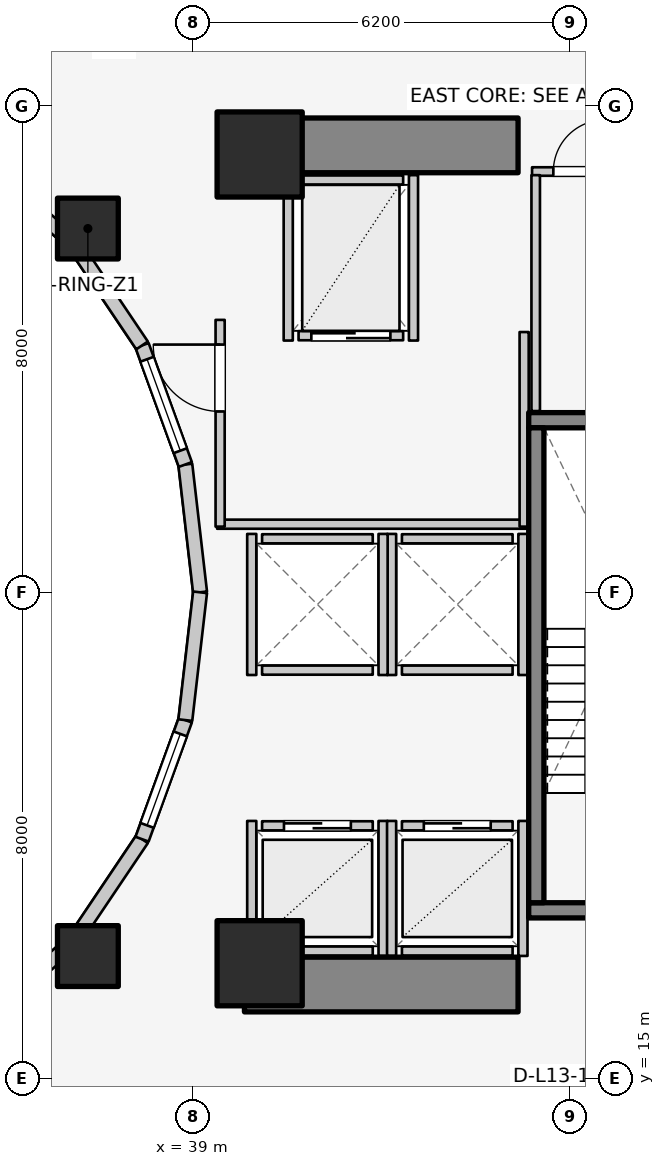
"""IFC4 building model, lengths in metres.
Left out: names, types, materials, properties, quantities, classifications, styles, units other than length and angle.
Written with IfcOpenShell. Run it as: python <this file> out.ifc"""

import sys

from ifc_helpers import new_model, si_unit, direction, frame, frame_2d, origin, origin_2d, place, context, subcontext, project, spatial, rectangle, extrude, element, fill, save


model = new_model("IFC4")
c1 = context("Model", 3, precision=1e-05, world=origin(), true_north=direction((0.0, 1.0)))
c2 = subcontext(c1, "Body", "Model", "MODEL_VIEW")
j1 = project(units=[si_unit("LENGTHUNIT", "METRE"), si_unit("PLANEANGLEUNIT", "RADIAN")], contexts=[c1])
p1 = place(None, origin())
s1 = spatial("IfcSite", under=j1, at=p1, CompositionType="ELEMENT")
p2 = place(p1, origin())
s2 = spatial("IfcBuilding", under=s1, at=p2, CompositionType="ELEMENT")
p3 = place(p2, frame((0.0, 0.0, 46.2)))
s3 = spatial("IfcBuildingStorey", under=s2, at=p3, CompositionType="ELEMENT", Elevation=46.2)
for number, where, z_axis, x_axis in (
    (1, (39.85, 16.55, 0.0), (0.0, 0.0, 1.0), (1.0, 0.0, 0.0)),
    (2, (39.85, 30.35, 0.0), (0.0, 0.0, 1.0), (1.0, 0.0, 0.0)),
):
    element("IfcWall", number, at=place(p3, frame(where, z_axis=z_axis, x_axis=x_axis)), inside=s3, PredefinedType="SHEAR", context=c2, shape_type="SweptSolid", body=[
        extrude(rectangle(XDim=4.5, YDim=0.9, at=frame_2d((2.25, 0.0))), origin(), (0.0, 0.0, 1.0), 3.1),
    ])
p4 = place(p3, frame((44.525, 17.77, 0.0), z_axis=(0.0, 0.0, 1.0), x_axis=(1.0, 0.0, 0.0)))
e3 = element("IfcWall", 3, at=p4, inside=s3, PredefinedType="SOLIDWALL", context=c2, shape_type="SweptSolid", body=[
    extrude(rectangle(XDim=3.37, YDim=0.25, at=frame_2d((1.685, 0.0))), origin(), (0.0, 0.0, 1.0), 3.1),
])
p5 = place(p4, frame((1.135, 0.0, 0.0)))
e4 = element("IfcOpeningElement", 4, at=p5, cuts=e3, PredefinedType="OPENING", context=c2, shape_type="SweptSolid", body=[
    extrude(rectangle(XDim=1.1, YDim=2.1, at=frame_2d((0.55, 1.05))), frame((0.0, 0.135, 0.0), z_axis=(0.0, -1.0, 0.0), x_axis=(1.0, 0.0, 0.0)), (0.0, 0.0, 1.0), 0.27),
])
p6 = place(p3, frame((44.525, 25.83, 0.0), z_axis=(0.0, 0.0, 1.0), x_axis=(1.0, 0.0, 0.0)))
e5 = element("IfcWall", 5, at=p6, inside=s3, PredefinedType="SOLIDWALL", context=c2, shape_type="SweptSolid", body=[
    extrude(rectangle(XDim=3.37, YDim=0.25, at=frame_2d((1.685, 0.0))), origin(), (0.0, 0.0, 1.0), 3.1),
])
p7 = place(p3, frame((44.65, 17.895, 0.0), z_axis=(0.0, 0.0, 1.0), x_axis=(0.0, 1.0, 0.0)))
e6 = element("IfcWall", 6, at=p7, inside=s3, PredefinedType="SOLIDWALL", context=c2, shape_type="SweptSolid", body=[
    extrude(rectangle(XDim=7.81, YDim=0.25, at=frame_2d((3.905, 0.0))), origin(), (0.0, 0.0, 1.0), 3.1),
])
for number, where, z_axis, x_axis in (
    (7, (40.1, 16.9, 0.0), (0.0, 0.0, 1.0), (1.0, 0.0, 0.0)),
    (8, (40.1, 30.2, 0.0), (0.0, 0.0, 1.0), (1.0, 0.0, 0.0)),
):
    element("IfcColumn", number, at=place(p3, frame(where, z_axis=z_axis, x_axis=x_axis)), inside=s3, PredefinedType="COLUMN", context=c2, shape_type="SweptSolid", body=[
        extrude(rectangle(XDim=1.4, YDim=1.4, at=origin_2d()), origin(), (0.0, 0.0, 1.0), 3.1),
    ])
for number, where, z_axis, x_axis in (
    (9, (37.275, 28.982, 0.0), (0.0, 0.0, 1.0), (1.0, 0.0, 0.0)),
    (10, (37.275, 17.018, 0.0), (0.0, 0.0, 1.0), (1.0, 0.0, 0.0)),
):
    element("IfcColumn", number, at=place(p3, frame(where, z_axis=z_axis, x_axis=x_axis)), inside=s3, PredefinedType="COLUMN", context=c2, shape_type="SweptSolid", body=[
        extrude(rectangle(XDim=1.0, YDim=1.0, at=origin_2d()), origin(), (0.0, 0.0, 1.0), 3.1),
    ])
p8 = place(p3, frame((39.12, 23.0, 0.0), z_axis=(0.0, 0.0, 1.0), x_axis=(-0.114711713601, 0.993398823617, 0.0)))
e11 = element("IfcWall", 11, at=p8, inside=s3, PredefinedType="STANDARD", context=c2, shape_type="SweptSolid", body=[
    extrude(rectangle(XDim=2.115, YDim=0.23, at=frame_2d((1.058, 0.0))), origin(), (0.0, 0.0, 1.0), 2.84),
])
p9 = place(p3, frame((38.877, 25.102, 0.0), z_axis=(0.0, 0.0, 1.0), x_axis=(-0.341423187295, 0.93990968033, 0.0)))
e12 = element("IfcWall", 12, at=p9, inside=s3, PredefinedType="STANDARD", context=c2, shape_type="SweptSolid", body=[
    extrude(rectangle(XDim=2.084, YDim=0.23, at=frame_2d((1.042, 0.0))), origin(), (0.0, 0.0, 1.0), 2.84),
])
p10 = place(p9, frame((0.242, 0.0, 0.85)))
e13 = element("IfcOpeningElement", 13, at=p10, cuts=e12, PredefinedType="OPENING", context=c2, shape_type="SweptSolid", body=[
    extrude(rectangle(XDim=1.6, YDim=1.65, at=frame_2d((0.8, 0.825))), frame((0.0, 0.125, 0.0), z_axis=(0.0, -1.0, 0.0), x_axis=(1.0, 0.0, 0.0)), (0.0, 0.0, 1.0), 0.25),
])
p11 = place(p3, frame((38.166, 27.06, 0.0), z_axis=(0.0, 0.0, 1.0), x_axis=(-0.558197800898, 0.829707909492, 0.0)))
e14 = element("IfcWall", 14, at=p11, inside=s3, PredefinedType="STANDARD", context=c2, shape_type="SweptSolid", body=[
    extrude(rectangle(XDim=2.027, YDim=0.23, at=frame_2d((1.013, 0.0))), origin(), (0.0, 0.0, 1.0), 2.16),
])
for number, where, z_axis, x_axis in (
    (15, (37.035, 28.742, 0.0), (0.0, 0.0, 1.0), (-0.753, 0.659, 0.0)),
    (16, (35.56, 15.968, 0.0), (0.0, 0.0, 1.0), (0.753, 0.659, 0.0)),
):
    element("IfcWall", number, at=place(p3, frame(where, z_axis=z_axis, x_axis=x_axis)), inside=s3, PredefinedType="STANDARD", context=c2, shape_type="SweptSolid", body=[
        extrude(rectangle(XDim=1.959, YDim=0.23, at=frame_2d((0.98, 0.0))), origin(), (0.0, 0.0, 1.0), 2.16),
    ])
p12 = place(p3, frame((37.035, 17.258, 0.0), z_axis=(0.0, 0.0, 1.0), x_axis=(0.558197800898, 0.829707909492, 0.0)))
e17 = element("IfcWall", 17, at=p12, inside=s3, PredefinedType="STANDARD", context=c2, shape_type="SweptSolid", body=[
    extrude(rectangle(XDim=2.027, YDim=0.23, at=frame_2d((1.013, 0.0))), origin(), (0.0, 0.0, 1.0), 2.16),
])
p13 = place(p3, frame((38.166, 18.94, 0.0), z_axis=(0.0, 0.0, 1.0), x_axis=(0.341423187295, 0.93990968033, 0.0)))
e18 = element("IfcWall", 18, at=p13, inside=s3, PredefinedType="STANDARD", context=c2, shape_type="SweptSolid", body=[
    extrude(rectangle(XDim=2.084, YDim=0.23, at=frame_2d((1.042, 0.0))), origin(), (0.0, 0.0, 1.0), 2.84),
])
p14 = place(p13, frame((0.242, 0.0, 0.85)))
e19 = element("IfcOpeningElement", 19, at=p14, cuts=e18, PredefinedType="OPENING", context=c2, shape_type="SweptSolid", body=[
    extrude(rectangle(XDim=1.6, YDim=1.65, at=frame_2d((0.8, 0.825))), frame((0.0, 0.125, 0.0), z_axis=(0.0, -1.0, 0.0), x_axis=(1.0, 0.0, 0.0)), (0.0, 0.0, 1.0), 0.25),
])
p15 = place(p3, frame((38.877, 20.898, 0.0), z_axis=(0.0, 0.0, 1.0), x_axis=(0.114711713601, 0.993398823617, 0.0)))
e20 = element("IfcWall", 20, at=p15, inside=s3, PredefinedType="STANDARD", context=c2, shape_type="SweptSolid", body=[
    extrude(rectangle(XDim=2.115, YDim=0.23, at=frame_2d((1.058, 0.0))), origin(), (0.0, 0.0, 1.0), 2.84),
])
p16 = place(p3, frame((40.14, 19.16, 0.0), z_axis=(0.0, 0.0, 1.0), x_axis=(1.0, 0.0, 0.0)))
e21 = element("IfcWall", 21, at=p16, inside=s3, PredefinedType="SOLIDWALL", context=c2, shape_type="SweptSolid", body=[
    extrude(rectangle(XDim=1.82, YDim=0.15, at=frame_2d((0.91, 0.0))), origin(), (0.0, 0.0, 1.0), 2.12),
])
p17 = place(p16, frame((0.36, 0.0, 0.0)))
e22 = element("IfcOpeningElement", 22, at=p17, cuts=e21, PredefinedType="OPENING", context=c2, shape_type="SweptSolid", body=[
    extrude(rectangle(XDim=1.1, YDim=2.1, at=frame_2d((0.55, 1.05))), frame((0.0, 0.085, 0.0), z_axis=(0.0, -1.0, 0.0), x_axis=(1.0, 0.0, 0.0)), (0.0, 0.0, 1.0), 0.17),
])
p18 = place(p3, frame((40.14, 17.1, 0.0), z_axis=(0.0, 0.0, 1.0), x_axis=(1.0, 0.0, 0.0)))
e23 = element("IfcWall", 23, at=p18, inside=s3, PredefinedType="SOLIDWALL", context=c2, shape_type="SweptSolid", body=[
    extrude(rectangle(XDim=1.82, YDim=0.15, at=frame_2d((0.91, 0.0))), origin(), (0.0, 0.0, 1.0), 2.12),
])
p19 = place(p3, frame((39.97, 17.02, 0.0), z_axis=(0.0, 0.0, 1.0), x_axis=(0.0, 1.0, 0.0)))
e24 = element("IfcWall", 24, at=p19, inside=s3, PredefinedType="SOLIDWALL", context=c2, shape_type="SweptSolid", body=[
    extrude(rectangle(XDim=2.22, YDim=0.15, at=frame_2d((1.11, 0.0))), origin(), (0.0, 0.0, 1.0), 2.12),
])
p20 = place(p3, frame((42.13, 17.02, 0.0), z_axis=(0.0, 0.0, 1.0), x_axis=(0.0, 1.0, 0.0)))
e25 = element("IfcWall", 25, at=p20, inside=s3, PredefinedType="SOLIDWALL", context=c2, shape_type="SweptSolid", body=[
    extrude(rectangle(XDim=2.22, YDim=0.15, at=frame_2d((1.11, 0.0))), origin(), (0.0, 0.0, 1.0), 2.855),
])
p21 = place(p3, frame((42.44, 19.16, 0.0), z_axis=(0.0, 0.0, 1.0), x_axis=(1.0, 0.0, 0.0)))
e26 = element("IfcWall", 26, at=p21, inside=s3, PredefinedType="SOLIDWALL", context=c2, shape_type="SweptSolid", body=[
    extrude(rectangle(XDim=1.82, YDim=0.15, at=frame_2d((0.91, 0.0))), origin(), (0.0, 0.0, 1.0), 2.855),
])
p22 = place(p21, frame((0.36, 0.0, 0.0)))
e27 = element("IfcOpeningElement", 27, at=p22, cuts=e26, PredefinedType="OPENING", context=c2, shape_type="SweptSolid", body=[
    extrude(rectangle(XDim=1.1, YDim=2.1, at=frame_2d((0.55, 1.05))), frame((0.0, 0.085, 0.0), z_axis=(0.0, -1.0, 0.0), x_axis=(1.0, 0.0, 0.0)), (0.0, 0.0, 1.0), 0.17),
])
p23 = place(p3, frame((42.44, 17.1, 0.0), z_axis=(0.0, 0.0, 1.0), x_axis=(1.0, 0.0, 0.0)))
e28 = element("IfcWall", 28, at=p23, inside=s3, PredefinedType="SOLIDWALL", context=c2, shape_type="SweptSolid", body=[
    extrude(rectangle(XDim=1.82, YDim=0.15, at=frame_2d((0.91, 0.0))), origin(), (0.0, 0.0, 1.0), 2.855),
])
p24 = place(p3, frame((42.27, 17.02, 0.0), z_axis=(0.0, 0.0, 1.0), x_axis=(0.0, 1.0, 0.0)))
e29 = element("IfcWall", 29, at=p24, inside=s3, PredefinedType="SOLIDWALL", context=c2, shape_type="SweptSolid", body=[
    extrude(rectangle(XDim=2.22, YDim=0.15, at=frame_2d((1.11, 0.0))), origin(), (0.0, 0.0, 1.0), 2.855),
])
p25 = place(p3, frame((44.43, 17.02, 0.0), z_axis=(0.0, 0.0, 1.0), x_axis=(0.0, 1.0, 0.0)))
e30 = element("IfcWall", 30, at=p25, inside=s3, PredefinedType="SOLIDWALL", context=c2, shape_type="SweptSolid", body=[
    extrude(rectangle(XDim=2.22, YDim=0.15, at=frame_2d((1.11, 0.0))), origin(), (0.0, 0.0, 1.0), 2.12),
])
for number, where, z_axis, x_axis in (
    (31, (42.44, 21.72, 0.0), (0.0, 0.0, 1.0), (1.0, 0.0, 0.0)),
    (32, (42.44, 23.88, 0.0), (0.0, 0.0, 1.0), (1.0, 0.0, 0.0)),
):
    element("IfcWall", number, at=place(p3, frame(where, z_axis=z_axis, x_axis=x_axis)), inside=s3, PredefinedType="SOLIDWALL", context=c2, shape_type="SweptSolid", body=[
        extrude(rectangle(XDim=1.82, YDim=0.15, at=frame_2d((0.91, 0.0))), origin(), (0.0, 0.0, 1.0), 2.855),
    ])
for number, where, z_axis, x_axis in (
    (33, (42.27, 21.64, 0.0), (0.0, 0.0, 1.0), (0.0, 1.0, 0.0)),
    (34, (44.43, 21.64, 0.0), (0.0, 0.0, 1.0), (0.0, 1.0, 0.0)),
):
    element("IfcWall", number, at=place(p3, frame(where, z_axis=z_axis, x_axis=x_axis)), inside=s3, PredefinedType="SOLIDWALL", context=c2, shape_type="SweptSolid", body=[
        extrude(rectangle(XDim=2.32, YDim=0.15, at=frame_2d((1.16, 0.0))), origin(), (0.0, 0.0, 1.0), 2.855),
    ])
for number, where, z_axis, x_axis in (
    (35, (40.14, 21.72, 0.0), (0.0, 0.0, 1.0), (1.0, 0.0, 0.0)),
    (36, (40.14, 23.88, 0.0), (0.0, 0.0, 1.0), (1.0, 0.0, 0.0)),
):
    element("IfcWall", number, at=place(p3, frame(where, z_axis=z_axis, x_axis=x_axis)), inside=s3, PredefinedType="SOLIDWALL", context=c2, shape_type="SweptSolid", body=[
        extrude(rectangle(XDim=1.82, YDim=0.15, at=frame_2d((0.91, 0.0))), origin(), (0.0, 0.0, 1.0), 2.12),
    ])
p26 = place(p3, frame((39.97, 21.64, 0.0), z_axis=(0.0, 0.0, 1.0), x_axis=(0.0, 1.0, 0.0)))
e37 = element("IfcWall", 37, at=p26, inside=s3, PredefinedType="SOLIDWALL", context=c2, shape_type="SweptSolid", body=[
    extrude(rectangle(XDim=2.32, YDim=0.15, at=frame_2d((1.16, 0.0))), origin(), (0.0, 0.0, 1.0), 2.12),
])
p27 = place(p3, frame((42.13, 21.64, 0.0), z_axis=(0.0, 0.0, 1.0), x_axis=(0.0, 1.0, 0.0)))
e38 = element("IfcWall", 38, at=p27, inside=s3, PredefinedType="SOLIDWALL", context=c2, shape_type="SweptSolid", body=[
    extrude(rectangle(XDim=2.32, YDim=0.15, at=frame_2d((1.16, 0.0))), origin(), (0.0, 0.0, 1.0), 2.855),
])
p28 = place(p3, frame((40.74, 27.22, 0.0), z_axis=(0.0, 0.0, 1.0), x_axis=(1.0, 0.0, 0.0)))
e39 = element("IfcWall", 39, at=p28, inside=s3, PredefinedType="SOLIDWALL", context=c2, shape_type="SweptSolid", body=[
    extrude(rectangle(XDim=1.72, YDim=0.15, at=frame_2d((0.86, 0.0))), origin(), (0.0, 0.0, 1.0), 2.855),
])
p29 = place(p28, frame((0.21, 0.0, 0.0)))
e40 = element("IfcOpeningElement", 40, at=p29, cuts=e39, PredefinedType="OPENING", context=c2, shape_type="SweptSolid", body=[
    extrude(rectangle(XDim=1.3, YDim=2.1, at=frame_2d((0.65, 1.05))), frame((0.0, 0.085, 0.0), z_axis=(0.0, -1.0, 0.0), x_axis=(1.0, 0.0, 0.0)), (0.0, 0.0, 1.0), 0.17),
])
p30 = place(p3, frame((40.74, 29.78, 0.0), z_axis=(0.0, 0.0, 1.0), x_axis=(1.0, 0.0, 0.0)))
e41 = element("IfcWall", 41, at=p30, inside=s3, PredefinedType="SOLIDWALL", context=c2, shape_type="SweptSolid", body=[
    extrude(rectangle(XDim=1.72, YDim=0.15, at=frame_2d((0.86, 0.0))), origin(), (0.0, 0.0, 1.0), 2.855),
])
for number, where, z_axis, x_axis in (
    (42, (40.57, 27.14, 0.0), (0.0, 0.0, 1.0), (0.0, 1.0, 0.0)),
    (43, (42.63, 27.14, 0.0), (0.0, 0.0, 1.0), (0.0, 1.0, 0.0)),
):
    element("IfcWall", number, at=place(p3, frame(where, z_axis=z_axis, x_axis=x_axis)), inside=s3, PredefinedType="SOLIDWALL", context=c2, shape_type="SweptSolid", body=[
        extrude(rectangle(XDim=2.72, YDim=0.15, at=frame_2d((1.36, 0.0))), origin(), (0.0, 0.0, 1.0), 2.855),
    ])
p31 = place(p3, frame((39.4, 24.12, 0.0), z_axis=(0.0, 0.0, 1.0), x_axis=(1.0, 0.0, 0.0)))
e44 = element("IfcWall", 44, at=p31, inside=s3, PredefinedType="PARTITIONING", context=c2, shape_type="SweptSolid", body=[
    extrude(rectangle(XDim=5.08, YDim=0.15, at=frame_2d((2.54, 0.0))), origin(), (0.0, 0.0, 1.0), 2.12),
])
p32 = place(p3, frame((44.45, 24.08, 0.0), z_axis=(0.0, 0.0, 1.0), x_axis=(0.0, 1.0, 0.0)))
e45 = element("IfcWall", 45, at=p32, inside=s3, PredefinedType="PARTITIONING", context=c2, shape_type="SweptSolid", body=[
    extrude(rectangle(XDim=3.2, YDim=0.15, at=frame_2d((1.6, 0.0))), origin(), (0.0, 0.0, 1.0), 2.855),
])
p33 = place(p3, frame((39.45, 24.08, 0.0), z_axis=(0.0, 0.0, 1.0), x_axis=(0.0, 1.0, 0.0)))
e46 = element("IfcWall", 46, at=p33, inside=s3, PredefinedType="PARTITIONING", context=c2, shape_type="SweptSolid", body=[
    extrude(rectangle(XDim=3.4, YDim=0.15, at=frame_2d((1.7, 0.0))), origin(), (0.0, 0.0, 1.0), 2.855),
])
p34 = place(p33, frame((1.894, 0.0, 0.0)))
e47 = element("IfcOpeningElement", 47, at=p34, cuts=e46, PredefinedType="OPENING", context=c2, shape_type="SweptSolid", body=[
    extrude(rectangle(XDim=1.1, YDim=2.1, at=frame_2d((0.55, 1.05))), frame((0.0, 0.085, 0.0), z_axis=(0.0, -1.0, 0.0), x_axis=(1.0, 0.0, 0.0)), (0.0, 0.0, 1.0), 0.17),
])
p35 = place(p3, frame((44.58, 29.92, 0.0), z_axis=(0.0, 0.0, 1.0), x_axis=(1.0, 0.0, 0.0)))
e48 = element("IfcWall", 48, at=p35, inside=s3, PredefinedType="PLUMBINGWALL", context=c2, shape_type="SweptSolid", body=[
    extrude(rectangle(XDim=1.6, YDim=0.14, at=frame_2d((0.8, 0.0))), origin(), (0.0, 0.0, 1.0), 2.855),
])
p36 = place(p35, frame((0.35, 0.0, 0.0)))
e49 = element("IfcOpeningElement", 49, at=p36, cuts=e48, PredefinedType="OPENING", context=c2, shape_type="SweptSolid", body=[
    extrude(rectangle(XDim=0.85, YDim=2.05, at=frame_2d((0.425, 1.025))), frame((0.0, 0.08, 0.0), z_axis=(0.0, -1.0, 0.0), x_axis=(1.0, 0.0, 0.0)), (0.0, 0.0, 1.0), 0.16),
])
p37 = place(p3, frame((44.64, 25.98, 0.0), z_axis=(0.0, 0.0, 1.0), x_axis=(0.0, 1.0, 0.0)))
e50 = element("IfcWall", 50, at=p37, inside=s3, PredefinedType="PLUMBINGWALL", context=c2, shape_type="SweptSolid", body=[
    extrude(rectangle(XDim=3.88, YDim=0.14, at=frame_2d((1.94, 0.0))), origin(), (0.0, 0.0, 1.0), 2.855),
])
p38 = place(p10, origin())
e51 = element("IfcWindow", 51, at=p38, inside=s3, PartitioningType="SINGLE_PANEL", PredefinedType="WINDOW", context=c2, shape_type="SweptSolid", body=[
    extrude(rectangle(XDim=1.6, YDim=1.65, at=frame_2d((0.8, 0.825))), frame((0.0, 0.03, 0.0), z_axis=(0.0, -1.0, 0.0), x_axis=(1.0, 0.0, 0.0)), (0.0, 0.0, 1.0), 0.06),
])
fill(e13, e51)
p39 = place(p14, origin())
e52 = element("IfcWindow", 52, at=p39, inside=s3, PartitioningType="SINGLE_PANEL", PredefinedType="WINDOW", context=c2, shape_type="SweptSolid", body=[
    extrude(rectangle(XDim=1.6, YDim=1.65, at=frame_2d((0.8, 0.825))), frame((0.0, 0.03, 0.0), z_axis=(0.0, -1.0, 0.0), x_axis=(1.0, 0.0, 0.0)), (0.0, 0.0, 1.0), 0.06),
])
fill(e19, e52)
p40 = place(p17, origin())
e53 = element("IfcDoor", 53, at=p40, inside=s3, OperationType="DOUBLE_DOOR_SLIDING", PredefinedType="DOOR", context=c2, shape_type="SweptSolid", body=[
    extrude(rectangle(XDim=1.1, YDim=2.1, at=frame_2d((0.55, 1.05))), frame((0.0, 0.025, 0.0), z_axis=(0.0, -1.0, 0.0), x_axis=(1.0, 0.0, 0.0)), (0.0, 0.0, 1.0), 0.05),
])
fill(e22, e53)
p41 = place(p22, origin())
e54 = element("IfcDoor", 54, at=p41, inside=s3, OperationType="DOUBLE_DOOR_SLIDING", PredefinedType="DOOR", context=c2, shape_type="SweptSolid", body=[
    extrude(rectangle(XDim=1.1, YDim=2.1, at=frame_2d((0.55, 1.05))), frame((0.0, 0.025, 0.0), z_axis=(0.0, -1.0, 0.0), x_axis=(1.0, 0.0, 0.0)), (0.0, 0.0, 1.0), 0.05),
])
fill(e27, e54)
p42 = place(p29, origin())
e55 = element("IfcDoor", 55, at=p42, inside=s3, OperationType="DOUBLE_DOOR_SLIDING", PredefinedType="DOOR", context=c2, shape_type="SweptSolid", body=[
    extrude(rectangle(XDim=1.3, YDim=2.1, at=frame_2d((0.65, 1.05))), frame((0.0, 0.025, 0.0), z_axis=(0.0, -1.0, 0.0), x_axis=(1.0, 0.0, 0.0)), (0.0, 0.0, 1.0), 0.05),
])
fill(e40, e55)
p43 = place(p34, origin())
e56 = element("IfcDoor", 56, at=p43, inside=s3, OperationType="SINGLE_SWING_RIGHT", PredefinedType="DOOR", context=c2, shape_type="SweptSolid", body=[
    extrude(rectangle(XDim=1.1, YDim=2.1, at=frame_2d((0.55, 1.05))), frame((0.0, 0.025, 0.0), z_axis=(0.0, -1.0, 0.0), x_axis=(1.0, 0.0, 0.0)), (0.0, 0.0, 1.0), 0.05),
])
fill(e47, e56)
p44 = place(p36, origin())
e57 = element("IfcDoor", 57, at=p44, inside=s3, OperationType="SINGLE_SWING_RIGHT", PredefinedType="DOOR", context=c2, shape_type="SweptSolid", body=[
    extrude(rectangle(XDim=0.85, YDim=2.05, at=frame_2d((0.425, 1.025))), frame((0.0, 0.025, 0.0), z_axis=(0.0, -1.0, 0.0), x_axis=(1.0, 0.0, 0.0)), (0.0, 0.0, 1.0), 0.05),
])
fill(e49, e57)
save(model, sys.argv[1])
